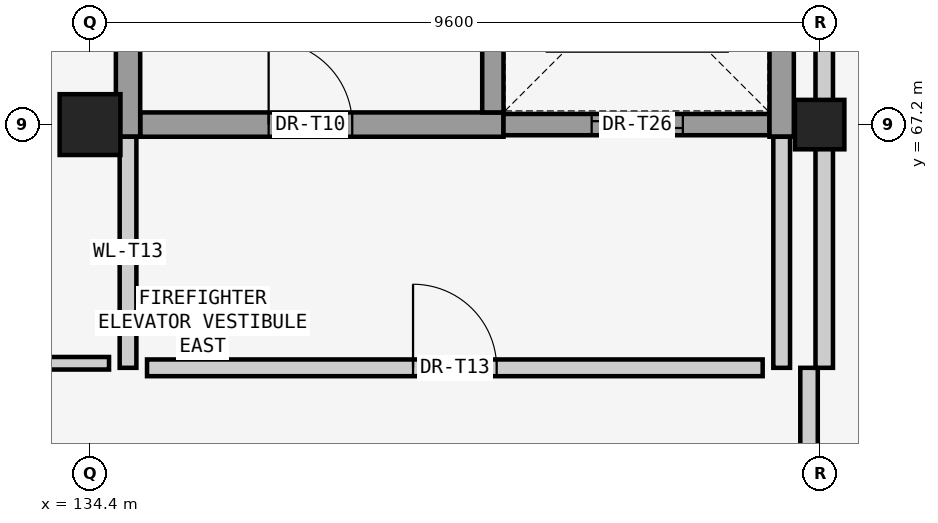
"""IFC4 building model, lengths in metres.
Left out: names, types, materials, properties, quantities, classifications, styles, units other than length and angle.
Written with IfcOpenShell. Run it as: python <this file> out.ifc"""

import sys

from ifc_helpers import new_model, si_unit, direction, frame, frame_2d, origin, origin_2d, place, context, subcontext, project, spatial, rectangle, extrude, element, fill, save


model = new_model("IFC4")
c1 = context("Model", 3, precision=1e-05, world=origin(), true_north=direction((0.0, 1.0)))
c2 = subcontext(c1, "Body", "Model", "MODEL_VIEW")
j1 = project(units=[si_unit("LENGTHUNIT", "METRE"), si_unit("PLANEANGLEUNIT", "RADIAN")], contexts=[c1])
p1 = place(None, origin())
s1 = spatial("IfcSite", under=j1, at=p1, CompositionType="ELEMENT")
p2 = place(p1, origin())
s2 = spatial("IfcBuilding", under=s1, at=p2, CompositionType="ELEMENT")
p3 = place(p2, frame((0.0, 0.0, 5.4)))
s3 = spatial("IfcBuildingStorey", under=s2, at=p3, CompositionType="ELEMENT", Elevation=5.4)
p4 = place(p3, frame((134.4, 67.2, 0.0), z_axis=(0.0, 0.0, 1.0), x_axis=(1.0, 0.0, 0.0)))
e1 = element("IfcColumn", 1, at=p4, inside=s3, PredefinedType="COLUMN", context=c2, shape_type="SweptSolid", body=[
    extrude(rectangle(XDim=0.8, YDim=0.8, at=origin_2d()), origin(), (0.0, 0.0, 1.0), 4.54),
])
p5 = place(p3, frame((144.0, 67.2, 0.0), z_axis=(0.0, 0.0, 1.0), x_axis=(1.0, 0.0, 0.0)))
e2 = element("IfcColumn", 2, at=p5, inside=s3, PredefinedType="PILASTER", context=c2, shape_type="SweptSolid", body=[
    extrude(rectangle(XDim=0.65, YDim=0.65, at=origin_2d()), origin(), (0.0, 0.0, 1.0), 4.53),
])
p6 = place(p3, frame((135.06, 67.2, 0.0), z_axis=(0.0, 0.0, 1.0), x_axis=(1.0, 0.0, 0.0)))
e3 = element("IfcWall", 3, at=p6, inside=s3, PredefinedType="SHEAR", context=c2, shape_type="SweptSolid", body=[
    extrude(rectangle(XDim=4.78, YDim=0.32, at=frame_2d((2.39, 0.0))), origin(), (0.0, 0.0, 1.0), 4.52),
])
p7 = place(p6, frame((1.69, 0.0, 0.0)))
e4 = element("IfcOpeningElement", 4, at=p7, cuts=e3, PredefinedType="OPENING", context=c2, shape_type="SweptSolid", body=[
    extrude(rectangle(XDim=1.1, YDim=2.2, at=frame_2d((0.55, 1.1))), frame((0.0, 0.17, 0.0), z_axis=(0.0, -1.0, 0.0), x_axis=(1.0, 0.0, 0.0)), (0.0, 0.0, 1.0), 0.34),
])
p8 = place(p3, frame((139.84, 67.2, 0.0), z_axis=(0.0, 0.0, 1.0), x_axis=(1.0, 0.0, 0.0)))
e5 = element("IfcWall", 5, at=p8, inside=s3, PredefinedType="SHEAR", context=c2, shape_type="SweptSolid", body=[
    extrude(rectangle(XDim=3.5, YDim=0.28, at=frame_2d((1.75, 0.0))), origin(), (0.0, 0.0, 1.0), 4.52),
])
p9 = place(p8, frame((1.16, 0.0, 0.0)))
e6 = element("IfcOpeningElement", 6, at=p9, cuts=e5, PredefinedType="OPENING", context=c2, shape_type="SweptSolid", body=[
    extrude(rectangle(XDim=1.2, YDim=2.2, at=frame_2d((0.6, 1.1))), frame((0.0, 0.15, 0.0), z_axis=(0.0, -1.0, 0.0), x_axis=(1.0, 0.0, 0.0)), (0.0, 0.0, 1.0), 0.3),
])
for number, where, z_axis, x_axis in (
    (7, (134.9, 75.4, 0.0), (0.0, 0.0, 1.0), (0.0, -1.0, 0.0)),
    (8, (143.5, 67.04, 0.0), (0.0, 0.0, 1.0), (0.0, 1.0, 0.0)),
):
    element("IfcWall", number, at=place(p3, frame(where, z_axis=z_axis, x_axis=x_axis)), inside=s3, PredefinedType="SHEAR", context=c2, shape_type="SweptSolid", body=[
        extrude(rectangle(XDim=8.36, YDim=0.32, at=frame_2d((4.18, 0.0))), origin(), (0.0, 0.0, 1.0), 4.52),
    ])
p10 = place(p3, frame((139.7, 67.36, 0.0), z_axis=(0.0, 0.0, 1.0), x_axis=(0.0, 1.0, 0.0)))
e9 = element("IfcWall", 9, at=p10, inside=s3, PredefinedType="SHEAR", context=c2, shape_type="SweptSolid", body=[
    extrude(rectangle(XDim=7.72, YDim=0.28, at=frame_2d((3.86, 0.0))), origin(), (0.0, 0.0, 1.0), 4.52),
])
for number, where, z_axis, x_axis in (
    (10, (134.9, 64.0, 0.0), (0.0, 0.0, 1.0), (0.0, 1.0, 0.0)),
    (11, (143.5, 64.0, 0.0), (0.0, 0.0, 1.0), (0.0, 1.0, 0.0)),
):
    element("IfcWall", number, at=place(p3, frame(where, z_axis=z_axis, x_axis=x_axis)), inside=s3, PredefinedType="SOLIDWALL", context=c2, shape_type="SweptSolid", body=[
        extrude(rectangle(XDim=3.04, YDim=0.22, at=frame_2d((1.52, 0.0))), origin(), (0.0, 0.0, 1.0), 4.32),
    ])
p11 = place(p3, frame((135.15, 64.0, 0.0), z_axis=(0.0, 0.0, 1.0), x_axis=(1.0, 0.0, 0.0)))
e12 = element("IfcWall", 12, at=p11, inside=s3, PredefinedType="SOLIDWALL", context=c2, shape_type="SweptSolid", body=[
    extrude(rectangle(XDim=8.1, YDim=0.22, at=frame_2d((4.05, 0.0))), origin(), (0.0, 0.0, 1.0), 4.32),
])
p12 = place(p11, frame((3.5, 0.0, 0.0)))
e13 = element("IfcOpeningElement", 13, at=p12, cuts=e12, PredefinedType="OPENING", context=c2, shape_type="SweptSolid", body=[
    extrude(rectangle(XDim=1.1, YDim=2.2, at=frame_2d((0.55, 1.1))), frame((0.0, 0.12, 0.0), z_axis=(0.0, -1.0, 0.0), x_axis=(1.0, 0.0, 0.0)), (0.0, 0.0, 1.0), 0.24),
])
p13 = place(p3, frame((128.6, 64.06, 0.0), z_axis=(0.0, 0.0, 1.0), x_axis=(1.0, 0.0, 0.0)))
e14 = element("IfcWall", 14, at=p13, inside=s3, PredefinedType="PARTITIONING", context=c2, shape_type="SweptSolid", body=[
    extrude(rectangle(XDim=6.05, YDim=0.165, at=frame_2d((3.025, 0.0))), origin(), (0.0, 0.0, 1.0), 4.48),
])
p14 = place(p13, frame((2.55, 0.0, 0.0)))
e15 = element("IfcOpeningElement", 15, at=p14, cuts=e14, PredefinedType="OPENING", context=c2, shape_type="SweptSolid", body=[
    extrude(rectangle(XDim=0.95, YDim=2.15, at=frame_2d((0.475, 1.075))), frame((0.0, 0.093, 0.0), z_axis=(0.0, -1.0, 0.0), x_axis=(1.0, 0.0, 0.0)), (0.0, 0.0, 1.0), 0.185),
])
p15 = place(p3, frame((143.86, 60.4, 0.0), z_axis=(0.0, 0.0, 1.0), x_axis=(0.0, 1.0, 0.0)))
e16 = element("IfcWall", 16, at=p15, inside=s3, PredefinedType="SOLIDWALL", context=c2, shape_type="SweptSolid", body=[
    extrude(rectangle(XDim=3.6, YDim=0.23, at=frame_2d((1.8, 0.0))), origin(), (0.0, 0.0, 1.0), 3.81),
])
p16 = place(p3, frame((144.06, 64.0, 0.0), z_axis=(0.0, 0.0, 1.0), x_axis=(0.0, 1.0, 0.0)))
e17 = element("IfcWall", 17, at=p16, inside=s3, PredefinedType="SOLIDWALL", context=c2, shape_type="SweptSolid", body=[
    extrude(rectangle(XDim=11.38, YDim=0.23, at=frame_2d((5.69, 0.0))), origin(), (0.0, 0.0, 1.0), 3.81),
])
p17 = place(p7, origin())
e18 = element("IfcDoor", 18, at=p17, inside=s3, OperationType="SINGLE_SWING_LEFT", PredefinedType="DOOR", context=c2, shape_type="SweptSolid", body=[
    extrude(rectangle(XDim=1.1, YDim=2.2, at=frame_2d((0.55, 1.1))), frame((0.0, 0.025, 0.0), z_axis=(0.0, -1.0, 0.0), x_axis=(1.0, 0.0, 0.0)), (0.0, 0.0, 1.0), 0.05),
])
fill(e4, e18)
p18 = place(p9, origin())
e19 = element("IfcDoor", 19, at=p18, inside=s3, OperationType="SLIDING_TO_RIGHT", PredefinedType="DOOR", context=c2, shape_type="SweptSolid", body=[
    extrude(rectangle(XDim=1.2, YDim=2.2, at=frame_2d((0.6, 1.1))), frame((0.0, 0.025, 0.0), z_axis=(0.0, -1.0, 0.0), x_axis=(1.0, 0.0, 0.0)), (0.0, 0.0, 1.0), 0.05),
])
fill(e6, e19)
p19 = place(p12, origin())
e20 = element("IfcDoor", 20, at=p19, inside=s3, OperationType="SINGLE_SWING_LEFT", PredefinedType="DOOR", context=c2, shape_type="SweptSolid", body=[
    extrude(rectangle(XDim=1.1, YDim=2.2, at=frame_2d((0.55, 1.1))), frame((0.0, 0.025, 0.0), z_axis=(0.0, -1.0, 0.0), x_axis=(1.0, 0.0, 0.0)), (0.0, 0.0, 1.0), 0.05),
])
fill(e13, e20)
save(model, sys.argv[1])
